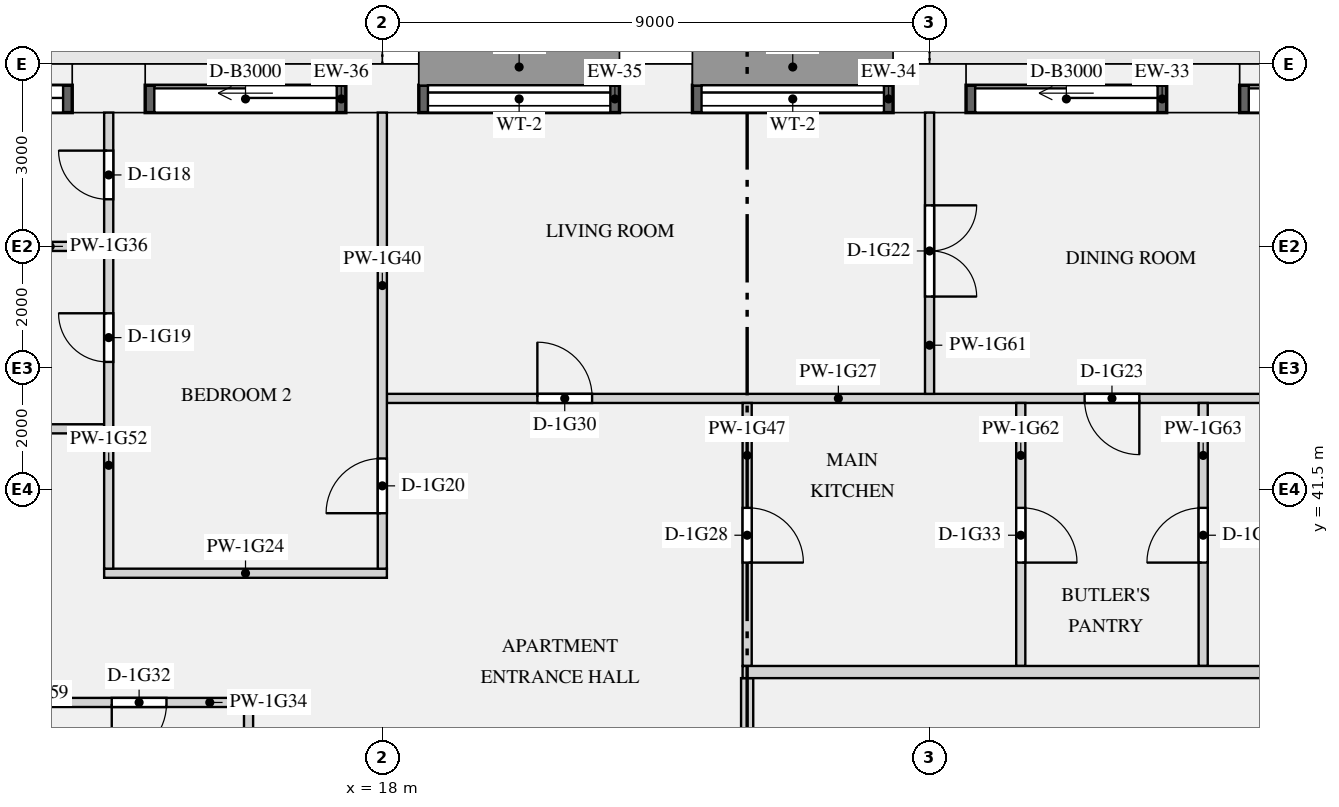
"""IFC4 building model, lengths in metres.
Left out: names, types, materials, properties, quantities, classifications, styles, units other than length and angle.
Written with IfcOpenShell. Run it as: python <this file> out.ifc"""

import sys

from ifc_helpers import new_model, si_unit, direction, frame, frame_2d, origin, origin_2d, place, context, subcontext, project, spatial, rectangle, extrude, element, fill, save


model = new_model("IFC4")
c1 = context("Model", 3, precision=1e-05, world=origin(), true_north=direction((0.0, 1.0)))
c2 = subcontext(c1, "Body", "Model", "MODEL_VIEW")
j1 = project(units=[si_unit("LENGTHUNIT", "METRE"), si_unit("PLANEANGLEUNIT", "RADIAN")], contexts=[c1])
p1 = place(None, origin())
s1 = spatial("IfcSite", under=j1, at=p1, CompositionType="ELEMENT")
p2 = place(p1, origin())
s2 = spatial("IfcBuilding", under=s1, at=p2, CompositionType="ELEMENT")
p3 = place(p2, frame((0.0, 0.0, 66.75)))
s3 = spatial("IfcBuildingStorey", under=s2, at=p3, CompositionType="ELEMENT", Elevation=66.75)
for number, where, z_axis, x_axis in (
    (1, (31.5, 48.1, 0.0), (0.0, 0.0, 1.0), (-1.0, 0.0, 0.0)),
    (2, (27.0, 48.1, 0.0), (0.0, 0.0, 1.0), (-1.0, 0.0, 0.0)),
    (3, (22.5, 48.1, 0.0), (0.0, 0.0, 1.0), (-1.0, 0.0, 0.0)),
    (4, (18.0, 48.1, 0.0), (0.0, 0.0, 1.0), (-1.0, 0.0, 0.0)),
    (5, (13.5, 48.1, 0.0), (0.0, 0.0, 1.0), (-1.0, 0.0, 0.0)),
):
    element("IfcColumn", number, at=place(p3, frame(where, z_axis=z_axis, x_axis=x_axis)), inside=s3, PredefinedType="USERDEFINED", context=c2, shape_type="SweptSolid", body=[
        extrude(rectangle(XDim=1.2, YDim=0.8, at=origin_2d()), origin(), (0.0, 0.0, 1.0), 3.15),
    ])
p4 = place(p3, frame((35.4, 47.925, 0.0), z_axis=(0.0, 0.0, 1.0), x_axis=(-1.0, 0.0, 0.0)))
e6 = element("IfcWall", 6, at=p4, inside=s3, PredefinedType="SOLIDWALL", context=c2, shape_type="SweptSolid", body=[
    extrude(rectangle(XDim=3.3, YDim=0.45, at=frame_2d((1.65, 0.0))), origin(), (0.0, 0.0, 1.0), 2.83),
])
p5 = place(p4, frame((0.15, 0.0, 0.0)))
e7 = element("IfcOpeningElement", 7, at=p5, cuts=e6, PredefinedType="OPENING", context=c2, shape_type="SweptSolid", body=[
    extrude(rectangle(XDim=3.0, YDim=2.3, at=frame_2d((1.5, 1.15))), frame((0.0, 0.235, 0.0), z_axis=(0.0, -1.0, 0.0), x_axis=(1.0, 0.0, 0.0)), (0.0, 0.0, 1.0), 0.47),
])
p6 = place(p3, frame((30.9, 47.925, 0.0), z_axis=(0.0, 0.0, 1.0), x_axis=(-1.0, 0.0, 0.0)))
e8 = element("IfcWall", 8, at=p6, inside=s3, PredefinedType="SOLIDWALL", context=c2, shape_type="SweptSolid", body=[
    extrude(rectangle(XDim=3.3, YDim=0.45, at=frame_2d((1.65, 0.0))), origin(), (0.0, 0.0, 1.0), 2.83),
])
p7 = place(p6, frame((0.15, 0.0, 0.0)))
e9 = element("IfcOpeningElement", 9, at=p7, cuts=e8, PredefinedType="OPENING", context=c2, shape_type="SweptSolid", body=[
    extrude(rectangle(XDim=3.0, YDim=2.3, at=frame_2d((1.5, 1.15))), frame((0.0, 0.235, 0.0), z_axis=(0.0, -1.0, 0.0), x_axis=(1.0, 0.0, 0.0)), (0.0, 0.0, 1.0), 0.47),
])
p8 = place(p3, frame((26.4, 47.925, 0.9), z_axis=(0.0, 0.0, 1.0), x_axis=(-1.0, 0.0, 0.0)))
e10 = element("IfcWall", 10, at=p8, inside=s3, PredefinedType="SOLIDWALL", context=c2, shape_type="SweptSolid", body=[
    extrude(rectangle(XDim=3.3, YDim=0.45, at=frame_2d((1.65, 0.0))), origin(), (0.0, 0.0, 1.0), 1.93),
])
p9 = place(p8, frame((0.15, 0.0, 0.15)))
e11 = element("IfcOpeningElement", 11, at=p9, cuts=e10, PredefinedType="OPENING", context=c2, shape_type="SweptSolid", body=[
    extrude(rectangle(XDim=3.0, YDim=1.5, at=frame_2d((1.5, 0.75))), frame((0.0, 0.235, 0.0), z_axis=(0.0, -1.0, 0.0), x_axis=(1.0, 0.0, 0.0)), (0.0, 0.0, 1.0), 0.47),
])
p10 = place(p3, frame((21.9, 47.925, 0.9), z_axis=(0.0, 0.0, 1.0), x_axis=(-1.0, 0.0, 0.0)))
e12 = element("IfcWall", 12, at=p10, inside=s3, PredefinedType="SOLIDWALL", context=c2, shape_type="SweptSolid", body=[
    extrude(rectangle(XDim=3.3, YDim=0.45, at=frame_2d((1.65, 0.0))), origin(), (0.0, 0.0, 1.0), 1.93),
])
p11 = place(p10, frame((0.15, 0.0, 0.15)))
e13 = element("IfcOpeningElement", 13, at=p11, cuts=e12, PredefinedType="OPENING", context=c2, shape_type="SweptSolid", body=[
    extrude(rectangle(XDim=3.0, YDim=1.5, at=frame_2d((1.5, 0.75))), frame((0.0, 0.235, 0.0), z_axis=(0.0, -1.0, 0.0), x_axis=(1.0, 0.0, 0.0)), (0.0, 0.0, 1.0), 0.47),
])
p12 = place(p3, frame((17.4, 47.925, 0.0), z_axis=(0.0, 0.0, 1.0), x_axis=(-1.0, 0.0, 0.0)))
e14 = element("IfcWall", 14, at=p12, inside=s3, PredefinedType="SOLIDWALL", context=c2, shape_type="SweptSolid", body=[
    extrude(rectangle(XDim=3.3, YDim=0.45, at=frame_2d((1.65, 0.0))), origin(), (0.0, 0.0, 1.0), 2.83),
])
p13 = place(p12, frame((0.15, 0.0, 0.0)))
e15 = element("IfcOpeningElement", 15, at=p13, cuts=e14, PredefinedType="OPENING", context=c2, shape_type="SweptSolid", body=[
    extrude(rectangle(XDim=3.0, YDim=2.3, at=frame_2d((1.5, 1.15))), frame((0.0, 0.235, 0.0), z_axis=(0.0, -1.0, 0.0), x_axis=(1.0, 0.0, 0.0)), (0.0, 0.0, 1.0), 0.47),
])
p14 = place(p3, frame((12.9, 47.925, 0.0), z_axis=(0.0, 0.0, 1.0), x_axis=(-1.0, 0.0, 0.0)))
e16 = element("IfcWall", 16, at=p14, inside=s3, PredefinedType="SOLIDWALL", context=c2, shape_type="SweptSolid", body=[
    extrude(rectangle(XDim=3.3, YDim=0.45, at=frame_2d((1.65, 0.0))), origin(), (0.0, 0.0, 1.0), 2.83),
])
p15 = place(p14, frame((0.15, 0.0, 0.0)))
e17 = element("IfcOpeningElement", 17, at=p15, cuts=e16, PredefinedType="OPENING", context=c2, shape_type="SweptSolid", body=[
    extrude(rectangle(XDim=3.0, YDim=2.3, at=frame_2d((1.5, 1.15))), frame((0.0, 0.235, 0.0), z_axis=(0.0, -1.0, 0.0), x_axis=(1.0, 0.0, 0.0)), (0.0, 0.0, 1.0), 0.47),
])
p16 = place(p3, frame((23.925, 38.5, 0.0), z_axis=(0.0, 0.0, 1.0), x_axis=(1.0, 0.0, 0.0)))
e18 = element("IfcWall", 18, at=p16, inside=s3, PredefinedType="PARTITIONING", context=c2, shape_type="SweptSolid", body=[
    extrude(rectangle(XDim=24.175, YDim=0.2, at=frame_2d((12.087, 0.0))), origin(), (0.0, 0.0, 1.0), 2.83),
])
p17 = place(p16, frame((21.375, 0.0, 0.0)))
e19 = element("IfcOpeningElement", 19, at=p17, cuts=e18, PredefinedType="OPENING", context=c2, shape_type="SweptSolid", body=[
    extrude(rectangle(XDim=1.1, YDim=2.1, at=frame_2d((0.55, 1.05))), frame((0.0, 0.11, 0.0), z_axis=(0.0, -1.0, 0.0), x_axis=(1.0, 0.0, 0.0)), (0.0, 0.0, 1.0), 0.22),
])
p18 = place(p3, frame((13.425, 40.125, 0.0), z_axis=(0.0, 0.0, 1.0), x_axis=(1.0, 0.0, 0.0)))
e20 = element("IfcWall", 20, at=p18, inside=s3, PredefinedType="PARTITIONING", context=c2, shape_type="SweptSolid", body=[
    extrude(rectangle(XDim=4.65, YDim=0.15, at=frame_2d((2.325, 0.0))), origin(), (0.0, 0.0, 1.0), 2.83),
])
p19 = place(p3, frame((18.075, 43.0, 0.0), z_axis=(0.0, 0.0, 1.0), x_axis=(1.0, 0.0, 0.0)))
e21 = element("IfcWall", 21, at=p19, inside=s3, PredefinedType="PARTITIONING", context=c2, shape_type="SweptSolid", body=[
    extrude(rectangle(XDim=26.825, YDim=0.15, at=frame_2d((13.413, 0.0))), origin(), (0.0, 0.0, 1.0), 2.83),
])
p20 = place(p19, frame((14.925, 0.0, 0.0)))
e22 = element("IfcOpeningElement", 22, at=p20, cuts=e21, PredefinedType="OPENING", context=c2, shape_type="SweptSolid", body=[
    extrude(rectangle(XDim=1.5, YDim=2.1, at=frame_2d((0.75, 1.05))), frame((0.0, 0.085, 0.0), z_axis=(0.0, -1.0, 0.0), x_axis=(1.0, 0.0, 0.0)), (0.0, 0.0, 1.0), 0.17),
])
p21 = place(p19, frame((11.475, 0.0, 0.0)))
e23 = element("IfcOpeningElement", 23, at=p21, cuts=e21, PredefinedType="OPENING", context=c2, shape_type="SweptSolid", body=[
    extrude(rectangle(XDim=0.9, YDim=2.1, at=frame_2d((0.45, 1.05))), frame((0.0, 0.085, 0.0), z_axis=(0.0, -1.0, 0.0), x_axis=(1.0, 0.0, 0.0)), (0.0, 0.0, 1.0), 0.17),
])
p22 = place(p19, frame((2.475, 0.0, 0.0)))
e24 = element("IfcOpeningElement", 24, at=p22, cuts=e21, PredefinedType="OPENING", context=c2, shape_type="SweptSolid", body=[
    extrude(rectangle(XDim=0.9, YDim=2.1, at=frame_2d((0.45, 1.05))), frame((0.0, 0.085, 0.0), z_axis=(0.0, -1.0, 0.0), x_axis=(1.0, 0.0, 0.0)), (0.0, 0.0, 1.0), 0.17),
])
p23 = place(p19, frame((21.675, 0.0, 0.0)))
e25 = element("IfcOpeningElement", 25, at=p23, cuts=e21, PredefinedType="OPENING", context=c2, shape_type="SweptSolid", body=[
    extrude(rectangle(XDim=1.5, YDim=2.1, at=frame_2d((0.75, 1.05))), frame((0.0, 0.085, 0.0), z_axis=(0.0, -1.0, 0.0), x_axis=(1.0, 0.0, 0.0)), (0.0, 0.0, 1.0), 0.17),
])
p24 = place(p3, frame((12.3, 38.0, 0.0), z_axis=(0.0, 0.0, 1.0), x_axis=(1.0, 0.0, 0.0)))
e26 = element("IfcWall", 26, at=p24, inside=s3, PredefinedType="PARTITIONING", context=c2, shape_type="SweptSolid", body=[
    extrude(rectangle(XDim=3.575, YDim=0.15, at=frame_2d((1.788, 0.0))), origin(), (0.0, 0.0, 1.0), 2.83),
])
p25 = place(p24, frame((1.25, 0.0, 0.0)))
e27 = element("IfcOpeningElement", 27, at=p25, cuts=e26, PredefinedType="OPENING", context=c2, shape_type="SweptSolid", body=[
    extrude(rectangle(XDim=0.9, YDim=2.1, at=frame_2d((0.45, 1.05))), frame((0.0, 0.085, 0.0), z_axis=(0.0, -1.0, 0.0), x_axis=(1.0, 0.0, 0.0)), (0.0, 0.0, 1.0), 0.17),
])
p26 = place(p3, frame((9.075, 42.5, 0.0), z_axis=(0.0, 0.0, 1.0), x_axis=(1.0, 0.0, 0.0)))
e28 = element("IfcWall", 28, at=p26, inside=s3, PredefinedType="PARTITIONING", context=c2, shape_type="SweptSolid", body=[
    extrude(rectangle(XDim=4.35, YDim=0.15, at=frame_2d((2.175, 0.0))), origin(), (0.0, 0.0, 1.0), 2.83),
])
p27 = place(p3, frame((9.075, 45.5, 0.0), z_axis=(0.0, 0.0, 1.0), x_axis=(1.0, 0.0, 0.0)))
e29 = element("IfcWall", 29, at=p27, inside=s3, PredefinedType="PARTITIONING", context=c2, shape_type="SweptSolid", body=[
    extrude(rectangle(XDim=4.35, YDim=0.15, at=frame_2d((2.175, 0.0))), origin(), (0.0, 0.0, 1.0), 2.83),
])
p28 = place(p27, frame((1.775, 0.0, 0.0)))
e30 = element("IfcOpeningElement", 30, at=p28, cuts=e29, PredefinedType="OPENING", context=c2, shape_type="SweptSolid", body=[
    extrude(rectangle(XDim=0.8, YDim=2.1, at=frame_2d((0.4, 1.05))), frame((0.0, 0.085, 0.0), z_axis=(0.0, -1.0, 0.0), x_axis=(1.0, 0.0, 0.0)), (0.0, 0.0, 1.0), 0.17),
])
p29 = place(p3, frame((18.0, 40.2, 0.0), z_axis=(0.0, 0.0, 1.0), x_axis=(0.0, 1.0, 0.0)))
e31 = element("IfcWall", 31, at=p29, inside=s3, PredefinedType="PARTITIONING", context=c2, shape_type="SweptSolid", body=[
    extrude(rectangle(XDim=7.5, YDim=0.15, at=frame_2d((3.75, 0.0))), origin(), (0.0, 0.0, 1.0), 2.83),
])
p30 = place(p29, frame((0.912, 0.0, 0.0)))
e32 = element("IfcOpeningElement", 32, at=p30, cuts=e31, PredefinedType="OPENING", context=c2, shape_type="SweptSolid", body=[
    extrude(rectangle(XDim=0.9, YDim=2.1, at=frame_2d((0.45, 1.05))), frame((0.0, 0.085, 0.0), z_axis=(0.0, -1.0, 0.0), x_axis=(1.0, 0.0, 0.0)), (0.0, 0.0, 1.0), 0.17),
])
p31 = place(p3, frame((24.0, 38.6, 0.0), z_axis=(0.0, 0.0, 1.0), x_axis=(0.0, 1.0, 0.0)))
e33 = element("IfcWall", 33, at=p31, inside=s3, PredefinedType="PARTITIONING", context=c2, shape_type="SweptSolid", body=[
    extrude(rectangle(XDim=4.325, YDim=0.15, at=frame_2d((2.163, 0.0))), origin(), (0.0, 0.0, 1.0), 2.83),
])
p32 = place(p31, frame((1.7, 0.0, 0.0)))
e34 = element("IfcOpeningElement", 34, at=p32, cuts=e33, PredefinedType="OPENING", context=c2, shape_type="SweptSolid", body=[
    extrude(rectangle(XDim=0.9, YDim=2.1, at=frame_2d((0.45, 1.05))), frame((0.0, 0.085, 0.0), z_axis=(0.0, -1.0, 0.0), x_axis=(1.0, 0.0, 0.0)), (0.0, 0.0, 1.0), 0.17),
])
p33 = place(p3, frame((24.0, 27.1, 0.0), z_axis=(0.0, 0.0, 1.0), x_axis=(0.0, 1.0, 0.0)))
e35 = element("IfcWall", 35, at=p33, inside=s3, PredefinedType="PARTITIONING", context=c2, shape_type="SweptSolid", body=[
    extrude(rectangle(XDim=11.3, YDim=0.2, at=frame_2d((5.65, 0.0))), origin(), (0.0, 0.0, 1.0), 2.83),
])
p34 = place(p33, frame((5.35, 0.0, 0.0)))
e36 = element("IfcOpeningElement", 36, at=p34, cuts=e35, PredefinedType="OPENING", context=c2, shape_type="SweptSolid", body=[
    extrude(rectangle(XDim=1.1, YDim=2.1, at=frame_2d((0.55, 1.05))), frame((0.0, 0.11, 0.0), z_axis=(0.0, -1.0, 0.0), x_axis=(1.0, 0.0, 0.0)), (0.0, 0.0, 1.0), 0.22),
])
p35 = place(p3, frame((13.5, 40.2, 0.0), z_axis=(0.0, 0.0, 1.0), x_axis=(0.0, 1.0, 0.0)))
e37 = element("IfcWall", 37, at=p35, inside=s3, PredefinedType="PARTITIONING", context=c2, shape_type="SweptSolid", body=[
    extrude(rectangle(XDim=7.5, YDim=0.15, at=frame_2d((3.75, 0.0))), origin(), (0.0, 0.0, 1.0), 2.83),
])
p36 = place(p35, frame((6.075, 0.0, 0.0)))
e38 = element("IfcOpeningElement", 38, at=p36, cuts=e37, PredefinedType="OPENING", context=c2, shape_type="SweptSolid", body=[
    extrude(rectangle(XDim=0.8, YDim=2.1, at=frame_2d((0.4, 1.05))), frame((0.0, 0.085, 0.0), z_axis=(0.0, -1.0, 0.0), x_axis=(1.0, 0.0, 0.0)), (0.0, 0.0, 1.0), 0.17),
])
p37 = place(p35, frame((3.4, 0.0, 0.0)))
e39 = element("IfcOpeningElement", 39, at=p37, cuts=e37, PredefinedType="OPENING", context=c2, shape_type="SweptSolid", body=[
    extrude(rectangle(XDim=0.8, YDim=2.1, at=frame_2d((0.4, 1.05))), frame((0.0, 0.085, 0.0), z_axis=(0.0, -1.0, 0.0), x_axis=(1.0, 0.0, 0.0)), (0.0, 0.0, 1.0), 0.17),
])
p38 = place(p3, frame((15.8, 35.475, 0.0), z_axis=(0.0, 0.0, 1.0), x_axis=(0.0, 1.0, 0.0)))
e40 = element("IfcWall", 40, at=p38, inside=s3, PredefinedType="PARTITIONING", context=c2, shape_type="SweptSolid", body=[
    extrude(rectangle(XDim=2.45, YDim=0.15, at=frame_2d((1.225, 0.0))), origin(), (0.0, 0.0, 1.0), 2.83),
])
p39 = place(p3, frame((27.0, 43.075, 0.0), z_axis=(0.0, 0.0, 1.0), x_axis=(0.0, 1.0, 0.0)))
e41 = element("IfcWall", 41, at=p39, inside=s3, PredefinedType="PARTITIONING", context=c2, shape_type="SweptSolid", body=[
    extrude(rectangle(XDim=4.625, YDim=0.15, at=frame_2d((2.312, 0.0))), origin(), (0.0, 0.0, 1.0), 2.83),
])
p40 = place(p39, frame((1.6, 0.0, 0.0)))
e42 = element("IfcOpeningElement", 42, at=p40, cuts=e41, PredefinedType="OPENING", context=c2, shape_type="SweptSolid", body=[
    extrude(rectangle(XDim=1.5, YDim=2.1, at=frame_2d((0.75, 1.05))), frame((0.0, 0.085, 0.0), z_axis=(0.0, -1.0, 0.0), x_axis=(1.0, 0.0, 0.0)), (0.0, 0.0, 1.0), 0.17),
])
p41 = place(p3, frame((28.5, 38.6, 0.0), z_axis=(0.0, 0.0, 1.0), x_axis=(0.0, 1.0, 0.0)))
e43 = element("IfcWall", 43, at=p41, inside=s3, PredefinedType="PARTITIONING", context=c2, shape_type="SweptSolid", body=[
    extrude(rectangle(XDim=4.325, YDim=0.15, at=frame_2d((2.163, 0.0))), origin(), (0.0, 0.0, 1.0), 2.83),
])
p42 = place(p41, frame((1.7, 0.0, 0.0)))
e44 = element("IfcOpeningElement", 44, at=p42, cuts=e43, PredefinedType="OPENING", context=c2, shape_type="SweptSolid", body=[
    extrude(rectangle(XDim=0.9, YDim=2.1, at=frame_2d((0.45, 1.05))), frame((0.0, 0.085, 0.0), z_axis=(0.0, -1.0, 0.0), x_axis=(1.0, 0.0, 0.0)), (0.0, 0.0, 1.0), 0.17),
])
p43 = place(p3, frame((31.5, 38.6, 0.0), z_axis=(0.0, 0.0, 1.0), x_axis=(0.0, 1.0, 0.0)))
e45 = element("IfcWall", 45, at=p43, inside=s3, PredefinedType="PARTITIONING", context=c2, shape_type="SweptSolid", body=[
    extrude(rectangle(XDim=4.325, YDim=0.15, at=frame_2d((2.163, 0.0))), origin(), (0.0, 0.0, 1.0), 2.83),
])
p44 = place(p43, frame((1.7, 0.0, 0.0)))
e46 = element("IfcOpeningElement", 46, at=p44, cuts=e45, PredefinedType="OPENING", context=c2, shape_type="SweptSolid", body=[
    extrude(rectangle(XDim=0.9, YDim=2.1, at=frame_2d((0.45, 1.05))), frame((0.0, 0.085, 0.0), z_axis=(0.0, -1.0, 0.0), x_axis=(1.0, 0.0, 0.0)), (0.0, 0.0, 1.0), 0.17),
])
p45 = place(p5, origin())
e47 = element("IfcDoor", 47, at=p45, inside=s3, OperationType="SLIDING_TO_LEFT", PredefinedType="DOOR", context=c2, shape_type="SweptSolid", body=[
    extrude(rectangle(XDim=3.0, YDim=2.3, at=frame_2d((1.5, 1.15))), frame((0.0, -0.07, 0.0), z_axis=(0.0, -1.0, 0.0), x_axis=(1.0, 0.0, 0.0)), (0.0, 0.0, 1.0), 0.05),
])
fill(e7, e47)
p46 = place(p7, origin())
e48 = element("IfcDoor", 48, at=p46, inside=s3, OperationType="SLIDING_TO_LEFT", PredefinedType="DOOR", context=c2, shape_type="SweptSolid", body=[
    extrude(rectangle(XDim=3.0, YDim=2.3, at=frame_2d((1.5, 1.15))), frame((0.0, -0.07, 0.0), z_axis=(0.0, -1.0, 0.0), x_axis=(1.0, 0.0, 0.0)), (0.0, 0.0, 1.0), 0.05),
])
fill(e9, e48)
p47 = place(p9, origin())
e49 = element("IfcWindow", 49, at=p47, inside=s3, PartitioningType="SINGLE_PANEL", PredefinedType="WINDOW", context=c2, shape_type="SweptSolid", body=[
    extrude(rectangle(XDim=3.0, YDim=1.5, at=frame_2d((1.5, 0.75))), frame((0.0, -0.065, 0.0), z_axis=(0.0, -1.0, 0.0), x_axis=(1.0, 0.0, 0.0)), (0.0, 0.0, 1.0), 0.06),
])
fill(e11, e49)
p48 = place(p11, origin())
e50 = element("IfcWindow", 50, at=p48, inside=s3, PartitioningType="SINGLE_PANEL", PredefinedType="WINDOW", context=c2, shape_type="SweptSolid", body=[
    extrude(rectangle(XDim=3.0, YDim=1.5, at=frame_2d((1.5, 0.75))), frame((0.0, -0.065, 0.0), z_axis=(0.0, -1.0, 0.0), x_axis=(1.0, 0.0, 0.0)), (0.0, 0.0, 1.0), 0.06),
])
fill(e13, e50)
p49 = place(p13, origin())
e51 = element("IfcDoor", 51, at=p49, inside=s3, OperationType="SLIDING_TO_LEFT", PredefinedType="DOOR", context=c2, shape_type="SweptSolid", body=[
    extrude(rectangle(XDim=3.0, YDim=2.3, at=frame_2d((1.5, 1.15))), frame((0.0, -0.07, 0.0), z_axis=(0.0, -1.0, 0.0), x_axis=(1.0, 0.0, 0.0)), (0.0, 0.0, 1.0), 0.05),
])
fill(e15, e51)
p50 = place(p15, origin())
e52 = element("IfcDoor", 52, at=p50, inside=s3, OperationType="SLIDING_TO_LEFT", PredefinedType="DOOR", context=c2, shape_type="SweptSolid", body=[
    extrude(rectangle(XDim=3.0, YDim=2.3, at=frame_2d((1.5, 1.15))), frame((0.0, -0.07, 0.0), z_axis=(0.0, -1.0, 0.0), x_axis=(1.0, 0.0, 0.0)), (0.0, 0.0, 1.0), 0.05),
])
fill(e17, e52)
p51 = place(p36, origin())
e53 = element("IfcDoor", 53, at=p51, inside=s3, OperationType="SINGLE_SWING_RIGHT", PredefinedType="DOOR", context=c2, shape_type="SweptSolid", body=[
    extrude(rectangle(XDim=0.8, YDim=2.1, at=frame_2d((0.4, 1.05))), frame((0.0, 0.025, 0.0), z_axis=(0.0, -1.0, 0.0), x_axis=(1.0, 0.0, 0.0)), (0.0, 0.0, 1.0), 0.05),
])
fill(e38, e53)
p52 = place(p37, origin())
e54 = element("IfcDoor", 54, at=p52, inside=s3, OperationType="SINGLE_SWING_RIGHT", PredefinedType="DOOR", context=c2, shape_type="SweptSolid", body=[
    extrude(rectangle(XDim=0.8, YDim=2.1, at=frame_2d((0.4, 1.05))), frame((0.0, 0.025, 0.0), z_axis=(0.0, -1.0, 0.0), x_axis=(1.0, 0.0, 0.0)), (0.0, 0.0, 1.0), 0.05),
])
fill(e39, e54)
p53 = place(p30, origin())
e55 = element("IfcDoor", 55, at=p53, inside=s3, OperationType="SINGLE_SWING_LEFT", PredefinedType="DOOR", context=c2, shape_type="SweptSolid", body=[
    extrude(rectangle(XDim=0.9, YDim=2.1, at=frame_2d((0.45, 1.05))), frame((0.0, 0.025, 0.0), z_axis=(0.0, -1.0, 0.0), x_axis=(1.0, 0.0, 0.0)), (0.0, 0.0, 1.0), 0.05),
])
fill(e32, e55)
p54 = place(p40, frame((1.5, 0.0, 0.0), z_axis=(0.0, 0.0, 1.0), x_axis=(-1.0, 0.0, 0.0)))
e56 = element("IfcDoor", 56, at=p54, inside=s3, OperationType="DOUBLE_DOOR_SINGLE_SWING", PredefinedType="DOOR", context=c2, shape_type="SweptSolid", body=[
    extrude(rectangle(XDim=1.5, YDim=2.1, at=frame_2d((0.75, 1.05))), frame((0.0, 0.025, 0.0), z_axis=(0.0, -1.0, 0.0), x_axis=(1.0, 0.0, 0.0)), (0.0, 0.0, 1.0), 0.05),
])
fill(e42, e56)
p55 = place(p21, frame((0.9, 0.0, 0.0), z_axis=(0.0, 0.0, 1.0), x_axis=(-1.0, 0.0, 0.0)))
e57 = element("IfcDoor", 57, at=p55, inside=s3, OperationType="SINGLE_SWING_LEFT", PredefinedType="DOOR", context=c2, shape_type="SweptSolid", body=[
    extrude(rectangle(XDim=0.9, YDim=2.1, at=frame_2d((0.45, 1.05))), frame((0.0, 0.025, 0.0), z_axis=(0.0, -1.0, 0.0), x_axis=(1.0, 0.0, 0.0)), (0.0, 0.0, 1.0), 0.05),
])
fill(e23, e57)
p56 = place(p32, frame((0.9, 0.0, 0.0), z_axis=(0.0, 0.0, 1.0), x_axis=(-1.0, 0.0, 0.0)))
e58 = element("IfcDoor", 58, at=p56, inside=s3, OperationType="SINGLE_SWING_RIGHT", PredefinedType="DOOR", context=c2, shape_type="SweptSolid", body=[
    extrude(rectangle(XDim=0.9, YDim=2.1, at=frame_2d((0.45, 1.05))), frame((0.0, 0.025, 0.0), z_axis=(0.0, -1.0, 0.0), x_axis=(1.0, 0.0, 0.0)), (0.0, 0.0, 1.0), 0.05),
])
fill(e34, e58)
p57 = place(p22, origin())
e59 = element("IfcDoor", 59, at=p57, inside=s3, OperationType="SINGLE_SWING_LEFT", PredefinedType="DOOR", context=c2, shape_type="SweptSolid", body=[
    extrude(rectangle(XDim=0.9, YDim=2.1, at=frame_2d((0.45, 1.05))), frame((0.0, 0.025, 0.0), z_axis=(0.0, -1.0, 0.0), x_axis=(1.0, 0.0, 0.0)), (0.0, 0.0, 1.0), 0.05),
])
fill(e24, e59)
p58 = place(p25, frame((0.9, 0.0, 0.0), z_axis=(0.0, 0.0, 1.0), x_axis=(-1.0, 0.0, 0.0)))
e60 = element("IfcDoor", 60, at=p58, inside=s3, OperationType="SINGLE_SWING_RIGHT", PredefinedType="DOOR", context=c2, shape_type="SweptSolid", body=[
    extrude(rectangle(XDim=0.9, YDim=2.1, at=frame_2d((0.45, 1.05))), frame((0.0, 0.025, 0.0), z_axis=(0.0, -1.0, 0.0), x_axis=(1.0, 0.0, 0.0)), (0.0, 0.0, 1.0), 0.05),
])
fill(e27, e60)
p59 = place(p42, frame((0.9, 0.0, 0.0), z_axis=(0.0, 0.0, 1.0), x_axis=(-1.0, 0.0, 0.0)))
e61 = element("IfcDoor", 61, at=p59, inside=s3, OperationType="SINGLE_SWING_RIGHT", PredefinedType="DOOR", context=c2, shape_type="SweptSolid", body=[
    extrude(rectangle(XDim=0.9, YDim=2.1, at=frame_2d((0.45, 1.05))), frame((0.0, 0.025, 0.0), z_axis=(0.0, -1.0, 0.0), x_axis=(1.0, 0.0, 0.0)), (0.0, 0.0, 1.0), 0.05),
])
fill(e44, e61)
p60 = place(p44, origin())
e62 = element("IfcDoor", 62, at=p60, inside=s3, OperationType="SINGLE_SWING_LEFT", PredefinedType="DOOR", context=c2, shape_type="SweptSolid", body=[
    extrude(rectangle(XDim=0.9, YDim=2.1, at=frame_2d((0.45, 1.05))), frame((0.0, 0.025, 0.0), z_axis=(0.0, -1.0, 0.0), x_axis=(1.0, 0.0, 0.0)), (0.0, 0.0, 1.0), 0.05),
])
fill(e46, e62)
save(model, sys.argv[1])
